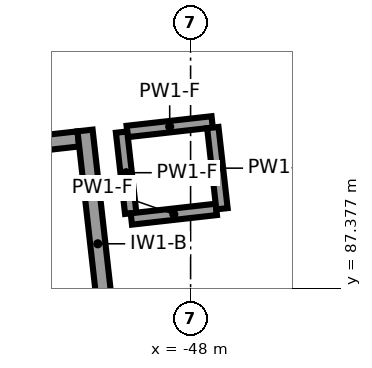
"""IFC4 building model, lengths in metres.
Left out: names, types, materials, properties, quantities, classifications, styles, units other than length and angle.
Written with IfcOpenShell. Run it as: python <this file> out.ifc"""

import sys

from ifc_helpers import new_model, si_unit, direction, frame, frame_2d, origin, place, context, subcontext, project, spatial, rectangle, extrude, element, save


model = new_model("IFC4")
c1 = context("Model", 3, precision=1e-05, world=origin(), true_north=direction((0.0, 1.0)))
c2 = subcontext(c1, "Body", "Model", "MODEL_VIEW")
j1 = project(units=[si_unit("LENGTHUNIT", "METRE"), si_unit("PLANEANGLEUNIT", "RADIAN")], contexts=[c1])
p1 = place(None, origin())
s1 = spatial("IfcSite", under=j1, at=p1, CompositionType="ELEMENT")
p2 = place(p1, origin())
s2 = spatial("IfcBuilding", under=s1, at=p2, CompositionType="ELEMENT")
p3 = place(p2, frame((0.0, 0.0, 18.0)))
s3 = spatial("IfcBuildingStorey", under=s2, at=p3, CompositionType="ELEMENT", Elevation=18.0)
p4 = place(p3, frame((-49.389, 89.454, 0.0), z_axis=(0.0, 0.0, 1.0), x_axis=(0.111976588553, -0.993710845073, 0.0)))
e1 = element("IfcWall", 1, at=p4, inside=s3, PredefinedType="SHEAR", context=c2, shape_type="SweptSolid", body=[
    extrude(rectangle(XDim=3.0, YDim=0.2, at=frame_2d((1.5, 0.0))), origin(), (0.0, 0.0, 1.0), 4.6),
])
p5 = place(p3, frame((-49.477, 89.343, 0.0), z_axis=(0.0, 0.0, 1.0), x_axis=(-0.993718105662, -0.11191213732, 0.0)))
e2 = element("IfcWall", 2, at=p5, inside=s3, PredefinedType="SHEAR", context=c2, shape_type="SweptSolid", body=[
    extrude(rectangle(XDim=1.9, YDim=0.2, at=frame_2d((0.95, 0.0))), origin(), (0.0, 0.0, 1.0), 4.6),
])
p6 = place(p3, frame((-47.716, 89.567, 0.0), z_axis=(0.0, 0.0, 1.0), x_axis=(-0.993710504932, -0.11197960702, 0.0)))
e3 = element("IfcWall", 3, at=p6, inside=s3, PredefinedType="PARTITIONING", context=c2, shape_type="SweptSolid", body=[
    extrude(rectangle(XDim=1.125, YDim=0.15, at=frame_2d((0.562, 0.0))), origin(), (0.0, 0.0, 1.0), 2.914),
])
p7 = place(p3, frame((-48.908, 89.432, 0.0), z_axis=(0.0, 0.0, 1.0), x_axis=(0.111951742856, -0.993713644503, 0.0)))
e4 = element("IfcWall", 4, at=p7, inside=s3, PredefinedType="PARTITIONING", context=c2, shape_type="SweptSolid", body=[
    extrude(rectangle(XDim=1.075, YDim=0.15, at=frame_2d((0.538, 0.0))), origin(), (0.0, 0.0, 1.0), 2.914),
])
p8 = place(p3, frame((-48.78, 88.29, 0.0), z_axis=(0.0, 0.0, 1.0), x_axis=(0.993710504932, 0.11197960702, 0.0)))
e5 = element("IfcWall", 5, at=p8, inside=s3, PredefinedType="PARTITIONING", context=c2, shape_type="SweptSolid", body=[
    extrude(rectangle(XDim=1.125, YDim=0.15, at=frame_2d((0.562, 0.0))), origin(), (0.0, 0.0, 1.0), 2.914),
])
p9 = place(p3, frame((-47.587, 88.424, 0.0), z_axis=(0.0, 0.0, 1.0), x_axis=(-0.111951742856, 0.993713644503, 0.0)))
e6 = element("IfcWall", 6, at=p9, inside=s3, PredefinedType="PARTITIONING", context=c2, shape_type="SweptSolid", body=[
    extrude(rectangle(XDim=1.075, YDim=0.15, at=frame_2d((0.538, 0.0))), origin(), (0.0, 0.0, 1.0), 2.914),
])
save(model, sys.argv[1])
